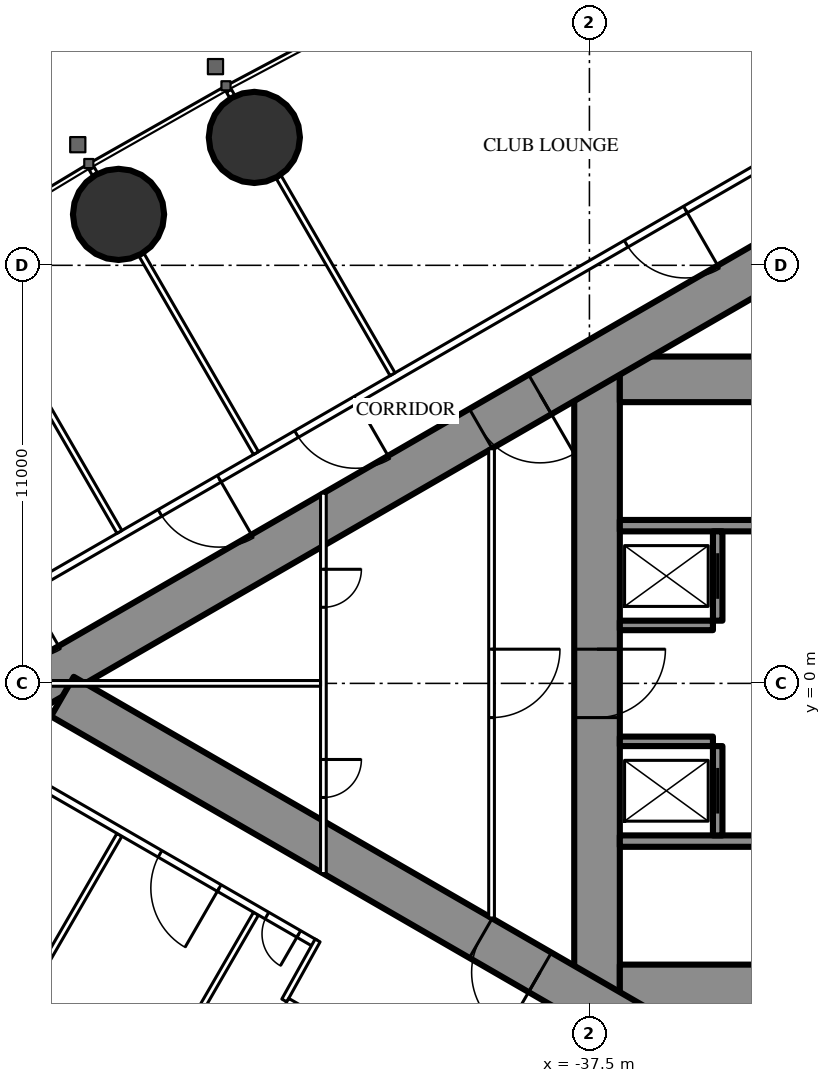
"""IFC4 building model, lengths in metres.
Left out: names, types, materials, properties, quantities, classifications, styles, units other than length and angle.
Written with IfcOpenShell. Run it as: python <this file> out.ifc"""

import sys

from ifc_helpers import new_model, si_unit, direction, frame, frame_2d, origin, origin_2d, place, context, subcontext, project, spatial, rectangle, circle, extrude, element, fill, save


model = new_model("IFC4")
c1 = context("Model", 3, precision=1e-05, world=origin(), true_north=direction((0.0, 1.0)))
c2 = subcontext(c1, "Body", "Model", "MODEL_VIEW")
j1 = project(units=[si_unit("LENGTHUNIT", "METRE"), si_unit("PLANEANGLEUNIT", "RADIAN")], contexts=[c1])
p1 = place(None, origin())
s1 = spatial("IfcSite", under=j1, at=p1, CompositionType="ELEMENT")
p2 = place(p1, origin())
s2 = spatial("IfcBuilding", under=s1, at=p2, CompositionType="ELEMENT")
p3 = place(p2, frame((0.0, 0.0, 247.7)))
s3 = spatial("IfcBuildingStorey", under=s2, at=p3, CompositionType="ELEMENT", Elevation=247.7)
for number, where, z_axis, x_axis in (
    (1, (-32.301, 17.745, 0.0), (0.0, 0.0, 1.0), (1.0, 0.0, 0.0)),
    (2, (-46.317, 14.365, 0.0), (0.0, 0.0, 1.0), (1.0, 0.0, 0.0)),
    (3, (-49.89, 12.34, 0.0), (0.0, 0.0, 1.0), (1.0, 0.0, 0.0)),
):
    element("IfcColumn", number, at=place(p3, frame(where, z_axis=z_axis, x_axis=x_axis)), inside=s3, PredefinedType="COLUMN", context=c2, shape_type="SweptSolid", body=[
        extrude(circle(Radius=1.2, at=origin_2d()), origin(), (0.0, 0.0, 1.0), 4.2),
    ])
p4 = place(p3, frame((-37.3, 8.6, 0.0), z_axis=(0.0, 0.0, 1.0), x_axis=(0.0, -1.0, 0.0)))
e4 = element("IfcWall", 4, at=p4, inside=s3, PredefinedType="SHEAR", context=c2, shape_type="SweptSolid", body=[
    extrude(rectangle(XDim=17.2, YDim=1.2, at=frame_2d((8.6, 0.0))), origin(), (0.0, 0.0, 1.0), 4.2),
])
p5 = place(p4, frame((7.7, 0.0, 0.0)))
e5 = element("IfcOpeningElement", 5, at=p5, cuts=e4, PredefinedType="OPENING", context=c2, shape_type="SweptSolid", body=[
    extrude(rectangle(XDim=1.8, YDim=2.2, at=frame_2d((0.9, 1.1))), frame((0.0, 0.61, 0.0), z_axis=(0.0, -1.0, 0.0), x_axis=(1.0, 0.0, 0.0)), (0.0, 0.0, 1.0), 1.22),
])
p6 = place(p3, frame((-28.3, 8.0, 0.0), z_axis=(0.0, 0.0, 1.0), x_axis=(-1.0, 0.0, 0.0)))
e6 = element("IfcWall", 6, at=p6, inside=s3, PredefinedType="SHEAR", context=c2, shape_type="SweptSolid", body=[
    extrude(rectangle(XDim=8.4, YDim=1.2, at=frame_2d((4.2, 0.0))), origin(), (0.0, 0.0, 1.0), 4.2),
])
p7 = place(p6, frame((0.25, 0.0, 0.0)))
e7 = element("IfcOpeningElement", 7, at=p7, cuts=e6, PredefinedType="OPENING", context=c2, shape_type="SweptSolid", body=[
    extrude(rectangle(XDim=1.0, YDim=2.2, at=frame_2d((0.5, 1.1))), frame((0.0, 0.61, 0.0), z_axis=(0.0, -1.0, 0.0), x_axis=(1.0, 0.0, 0.0)), (0.0, 0.0, 1.0), 1.22),
])
p8 = place(p3, frame((-28.3, -8.0, 0.0), z_axis=(0.0, 0.0, 1.0), x_axis=(-1.0, 0.0, 0.0)))
e8 = element("IfcWall", 8, at=p8, inside=s3, PredefinedType="SHEAR", context=c2, shape_type="SweptSolid", body=[
    extrude(rectangle(XDim=8.4, YDim=1.2, at=frame_2d((4.2, 0.0))), origin(), (0.0, 0.0, 1.0), 4.2),
])
p9 = place(p8, frame((0.25, 0.0, 0.0)))
e9 = element("IfcOpeningElement", 9, at=p9, cuts=e8, PredefinedType="OPENING", context=c2, shape_type="SweptSolid", body=[
    extrude(rectangle(XDim=1.0, YDim=2.2, at=frame_2d((0.5, 1.1))), frame((0.0, 0.61, 0.0), z_axis=(0.0, -1.0, 0.0), x_axis=(1.0, 0.0, 0.0)), (0.0, 0.0, 1.0), 1.22),
])
for number, where, z_axis, x_axis in (
    (10, (-28.3, 4.15, 0.0), (0.0, 0.0, 1.0), (-1.0, 0.0, 0.0)),
    (11, (-28.3, -4.15, 0.0), (0.0, 0.0, 1.0), (-1.0, 0.0, 0.0)),
):
    element("IfcWall", number, at=place(p3, frame(where, z_axis=z_axis, x_axis=x_axis)), inside=s3, PredefinedType="SHEAR", context=c2, shape_type="SweptSolid", body=[
        extrude(rectangle(XDim=8.4, YDim=0.3, at=frame_2d((4.2, 0.0))), origin(), (0.0, 0.0, 1.0), 4.2),
    ])
p10 = place(p3, frame((-34.125, 4.0, 0.0), z_axis=(0.0, 0.0, 1.0), x_axis=(0.0, -1.0, 0.0)))
e12 = element("IfcWall", 12, at=p10, inside=s3, PredefinedType="SHEAR", context=c2, shape_type="SweptSolid", body=[
    extrude(rectangle(XDim=2.35, YDim=0.25, at=frame_2d((1.175, 0.0))), origin(), (0.0, 0.0, 1.0), 4.2),
])
p11 = place(p10, frame((0.575, 0.0, 0.0)))
e13 = element("IfcOpeningElement", 13, at=p11, cuts=e12, PredefinedType="OPENING", context=c2, shape_type="SweptSolid", body=[
    extrude(rectangle(XDim=1.2, YDim=2.2, at=frame_2d((0.6, 1.1))), frame((0.0, 0.135, 0.0), z_axis=(0.0, -1.0, 0.0), x_axis=(1.0, 0.0, 0.0)), (0.0, 0.0, 1.0), 0.27),
])
p12 = place(p3, frame((-34.25, 1.525, 0.0), z_axis=(0.0, 0.0, 1.0), x_axis=(-1.0, 0.0, 0.0)))
e14 = element("IfcWall", 14, at=p12, inside=s3, PredefinedType="SHEAR", context=c2, shape_type="SweptSolid", body=[
    extrude(rectangle(XDim=2.45, YDim=0.25, at=frame_2d((1.225, 0.0))), origin(), (0.0, 0.0, 1.0), 4.2),
])
p13 = place(p3, frame((-34.125, -1.65, 0.0), z_axis=(0.0, 0.0, 1.0), x_axis=(0.0, -1.0, 0.0)))
e15 = element("IfcWall", 15, at=p13, inside=s3, PredefinedType="SHEAR", context=c2, shape_type="SweptSolid", body=[
    extrude(rectangle(XDim=2.35, YDim=0.25, at=frame_2d((1.175, 0.0))), origin(), (0.0, 0.0, 1.0), 4.2),
])
p14 = place(p13, frame((0.575, 0.0, 0.0)))
e16 = element("IfcOpeningElement", 16, at=p14, cuts=e15, PredefinedType="OPENING", context=c2, shape_type="SweptSolid", body=[
    extrude(rectangle(XDim=1.2, YDim=2.2, at=frame_2d((0.6, 1.1))), frame((0.0, 0.135, 0.0), z_axis=(0.0, -1.0, 0.0), x_axis=(1.0, 0.0, 0.0)), (0.0, 0.0, 1.0), 0.27),
])
p15 = place(p3, frame((-34.25, -1.525, 0.0), z_axis=(0.0, 0.0, 1.0), x_axis=(-1.0, 0.0, 0.0)))
e17 = element("IfcWall", 17, at=p15, inside=s3, PredefinedType="SHEAR", context=c2, shape_type="SweptSolid", body=[
    extrude(rectangle(XDim=2.45, YDim=0.25, at=frame_2d((1.225, 0.0))), origin(), (0.0, 0.0, 1.0), 4.2),
])
p16 = place(p3, frame((-27.2, 14.3, 0.0), z_axis=(0.0, 0.0, 1.0), x_axis=(-0.866026593062, -0.499997940104, 0.0)))
e18 = element("IfcWall", 18, at=p16, inside=s3, PredefinedType="SHEAR", context=c2, shape_type="SweptSolid", body=[
    extrude(rectangle(XDim=28.946, YDim=1.2, at=frame_2d((14.473, 0.0))), origin(), (0.0, 0.0, 1.0), 4.2),
])
p17 = place(p16, frame((4.6, 0.0, 0.0)))
e19 = element("IfcOpeningElement", 19, at=p17, cuts=e18, PredefinedType="OPENING", context=c2, shape_type="SweptSolid", body=[
    extrude(rectangle(XDim=1.0, YDim=2.2, at=frame_2d((0.5, 1.1))), frame((0.0, 0.61, 0.0), z_axis=(0.0, -1.0, 0.0), x_axis=(1.0, 0.0, 0.0)), (0.0, 0.0, 1.0), 1.22),
])
p18 = place(p16, frame((13.395, 0.0, 0.0)))
e20 = element("IfcOpeningElement", 20, at=p18, cuts=e18, PredefinedType="OPENING", context=c2, shape_type="SweptSolid", body=[
    extrude(rectangle(XDim=1.8, YDim=2.2, at=frame_2d((0.9, 1.1))), frame((0.0, 0.61, 0.0), z_axis=(0.0, -1.0, 0.0), x_axis=(1.0, 0.0, 0.0)), (0.0, 0.0, 1.0), 1.22),
])
p19 = place(p3, frame((-27.2, -14.3, 0.0), z_axis=(0.0, 0.0, 1.0), x_axis=(-0.866024021859, 0.500002393557, 0.0)))
e21 = element("IfcWall", 21, at=p19, inside=s3, PredefinedType="SHEAR", context=c2, shape_type="SweptSolid", body=[
    extrude(rectangle(XDim=27.907, YDim=1.2, at=frame_2d((13.954, 0.0))), origin(), (0.0, 0.0, 1.0), 4.2),
])
p20 = place(p19, frame((4.6, 0.0, 0.0)))
e22 = element("IfcOpeningElement", 22, at=p20, cuts=e21, PredefinedType="OPENING", context=c2, shape_type="SweptSolid", body=[
    extrude(rectangle(XDim=1.0, YDim=2.2, at=frame_2d((0.5, 1.1))), frame((0.0, 0.61, 0.0), z_axis=(0.0, -1.0, 0.0), x_axis=(1.0, 0.0, 0.0)), (0.0, 0.0, 1.0), 1.22),
])
p21 = place(p19, frame((13.395, 0.0, 0.0)))
e23 = element("IfcOpeningElement", 23, at=p21, cuts=e21, PredefinedType="OPENING", context=c2, shape_type="SweptSolid", body=[
    extrude(rectangle(XDim=1.8, YDim=2.2, at=frame_2d((0.9, 1.1))), frame((0.0, 0.61, 0.0), z_axis=(0.0, -1.0, 0.0), x_axis=(1.0, 0.0, 0.0)), (0.0, 0.0, 1.0), 1.22),
])
p22 = place(p3, frame((-28.681, 16.101, 0.0), z_axis=(0.0, 0.0, 1.0), x_axis=(-0.866024860443, -0.500000941094, 0.0)))
e24 = element("IfcWall", 24, at=p22, inside=s3, PredefinedType="PARTITIONING", context=c2, shape_type="SweptSolid", body=[
    extrude(rectangle(XDim=32.201, YDim=0.2, at=frame_2d((16.101, 0.0))), origin(), (0.0, 0.0, 1.0), 3.95),
])
p23 = place(p22, frame((7.266, 0.0, 0.0)))
e25 = element("IfcOpeningElement", 25, at=p23, cuts=e24, PredefinedType="OPENING", context=c2, shape_type="SweptSolid", body=[
    extrude(rectangle(XDim=1.8, YDim=2.2, at=frame_2d((0.9, 1.1))), frame((0.0, 0.11, 0.0), z_axis=(0.0, -1.0, 0.0), x_axis=(1.0, 0.0, 0.0)), (0.0, 0.0, 1.0), 0.22),
])
p24 = place(p22, frame((17.281, 0.0, 0.0)))
e26 = element("IfcOpeningElement", 26, at=p24, cuts=e24, PredefinedType="OPENING", context=c2, shape_type="SweptSolid", body=[
    extrude(rectangle(XDim=1.8, YDim=2.2, at=frame_2d((0.9, 1.1))), frame((0.0, 0.11, 0.0), z_axis=(0.0, -1.0, 0.0), x_axis=(1.0, 0.0, 0.0)), (0.0, 0.0, 1.0), 0.22),
])
p25 = place(p22, frame((21.43, 0.0, 0.0)))
e27 = element("IfcOpeningElement", 27, at=p25, cuts=e24, PredefinedType="OPENING", context=c2, shape_type="SweptSolid", body=[
    extrude(rectangle(XDim=1.8, YDim=2.2, at=frame_2d((0.9, 1.1))), frame((0.0, 0.11, 0.0), z_axis=(0.0, -1.0, 0.0), x_axis=(1.0, 0.0, 0.0)), (0.0, 0.0, 1.0), 0.22),
])
p26 = place(p22, frame((27.29, 0.0, 0.0)))
e28 = element("IfcOpeningElement", 28, at=p26, cuts=e24, PredefinedType="OPENING", context=c2, shape_type="SweptSolid", body=[
    extrude(rectangle(XDim=1.8, YDim=2.2, at=frame_2d((0.9, 1.1))), frame((0.0, 0.11, 0.0), z_axis=(0.0, -1.0, 0.0), x_axis=(1.0, 0.0, 0.0)), (0.0, 0.0, 1.0), 0.22),
])
p27 = place(p3, frame((-42.68, 8.134, 0.0), z_axis=(0.0, 0.0, 1.0), x_axis=(-0.499984479505, 0.866034364361, 0.0)))
e29 = element("IfcWall", 29, at=p27, inside=s3, PredefinedType="PARTITIONING", context=c2, shape_type="SweptSolid", body=[
    extrude(rectangle(XDim=5.995, YDim=0.15, at=frame_2d((2.998, 0.0))), origin(), (0.0, 0.0, 1.0), 3.05),
])
p28 = place(p3, frame((-46.898, 15.439, 0.0), z_axis=(0.0, 0.0, 1.0), x_axis=(-0.500232303069, 0.865891241997, 0.0)))
e30 = element("IfcWall", 30, at=p28, inside=s3, PredefinedType="PARTITIONING", context=c2, shape_type="SweptSolid", body=[
    extrude(rectangle(XDim=0.18, YDim=0.15, at=frame_2d((0.09, 0.0))), origin(), (0.0, 0.0, 1.0), 3.05),
])
p29 = place(p3, frame((-46.274, 6.059, 0.0), z_axis=(0.0, 0.0, 1.0), x_axis=(-0.500020471368, 0.866013584312, 0.0)))
e31 = element("IfcWall", 31, at=p29, inside=s3, PredefinedType="PARTITIONING", context=c2, shape_type="SweptSolid", body=[
    extrude(rectangle(XDim=6.028, YDim=0.15, at=frame_2d((3.014, 0.0))), origin(), (0.0, 0.0, 1.0), 3.05),
])
p30 = place(p3, frame((-50.508, 13.392, 0.0), z_axis=(0.0, 0.0, 1.0), x_axis=(-0.499644091975, 0.866230789891, 0.0)))
e32 = element("IfcWall", 32, at=p30, inside=s3, PredefinedType="PARTITIONING", context=c2, shape_type="SweptSolid", body=[
    extrude(rectangle(XDim=0.18, YDim=0.15, at=frame_2d((0.09, 0.0))), origin(), (0.0, 0.0, 1.0), 3.05),
])
p31 = place(p3, frame((-49.866, 3.985, 0.0), z_axis=(0.0, 0.0, 1.0), x_axis=(-0.500000694566, 0.866025002776, 0.0)))
e33 = element("IfcWall", 33, at=p31, inside=s3, PredefinedType="PARTITIONING", context=c2, shape_type="SweptSolid", body=[
    extrude(rectangle(XDim=5.95, YDim=0.15, at=frame_2d((2.975, 0.0))), origin(), (0.0, 0.0, 1.0), 3.05),
])
p32 = place(p3, frame((-46.274, -6.059, 0.0), z_axis=(0.0, 0.0, 1.0), x_axis=(-0.500020471368, -0.866013584312, 0.0)))
e34 = element("IfcWall", 34, at=p32, inside=s3, PredefinedType="PARTITIONING", context=c2, shape_type="SweptSolid", body=[
    extrude(rectangle(XDim=6.028, YDim=0.15, at=frame_2d((3.014, 0.0))), origin(), (0.0, 0.0, 1.0), 3.05),
])
p33 = place(p3, frame((-49.866, -3.985, 0.0), z_axis=(0.0, 0.0, 1.0), x_axis=(-0.500000694566, -0.866025002776, 0.0)))
e35 = element("IfcWall", 35, at=p33, inside=s3, PredefinedType="PARTITIONING", context=c2, shape_type="SweptSolid", body=[
    extrude(rectangle(XDim=5.95, YDim=0.15, at=frame_2d((2.975, 0.0))), origin(), (0.0, 0.0, 1.0), 3.05),
])
p34 = place(p3, frame((-44.715, -6.844, 0.0), z_axis=(0.0, 0.0, 1.0), x_axis=(-0.866025261224, 0.500000246922, 0.0)))
e36 = element("IfcWall", 36, at=p34, inside=s3, PredefinedType="PARTITIONING", context=c2, shape_type="SweptSolid", body=[
    extrude(rectangle(XDim=13.567, YDim=0.2, at=frame_2d((6.783, 0.0))), origin(), (0.0, 0.0, 1.0), 3.95),
])
p35 = place(p34, frame((8.716, 0.0, 0.0)))
e37 = element("IfcOpeningElement", 37, at=p35, cuts=e36, PredefinedType="OPENING", context=c2, shape_type="SweptSolid", body=[
    extrude(rectangle(XDim=1.8, YDim=2.2, at=frame_2d((0.9, 1.1))), frame((0.0, 0.11, 0.0), z_axis=(0.0, -1.0, 0.0), x_axis=(1.0, 0.0, 0.0)), (0.0, 0.0, 1.0), 0.22),
])
p36 = place(p34, frame((2.916, 0.0, 0.0)))
e38 = element("IfcOpeningElement", 38, at=p36, cuts=e36, PredefinedType="OPENING", context=c2, shape_type="SweptSolid", body=[
    extrude(rectangle(XDim=1.8, YDim=2.2, at=frame_2d((0.9, 1.1))), frame((0.0, 0.11, 0.0), z_axis=(0.0, -1.0, 0.0), x_axis=(1.0, 0.0, 0.0)), (0.0, 0.0, 1.0), 0.22),
])
p37 = place(p34, frame((0.5, 0.0, 0.0)))
e39 = element("IfcOpeningElement", 39, at=p37, cuts=e36, PredefinedType="OPENING", context=c2, shape_type="SweptSolid", body=[
    extrude(rectangle(XDim=0.967, YDim=2.2, at=frame_2d((0.483, 1.1))), frame((0.0, 0.11, 0.0), z_axis=(0.0, -1.0, 0.0), x_axis=(1.0, 0.0, 0.0)), (0.0, 0.0, 1.0), 0.22),
])
p38 = place(p3, frame((-44.652, -6.764, 0.0), z_axis=(0.0, 0.0, 1.0), x_axis=(-0.485528096672, -0.8742210632, 0.0)))
e40 = element("IfcWall", 40, at=p38, inside=s3, PredefinedType="PARTITIONING", context=c2, shape_type="SweptSolid", body=[
    extrude(rectangle(XDim=1.805, YDim=0.15, at=frame_2d((0.903, 0.0))), origin(), (0.0, 0.0, 1.0), 3.95),
])
p39 = place(p3, frame((-40.075, 6.174, 0.0), z_axis=(0.0, 0.0, 1.0), x_axis=(0.0, -1.0, 0.0)))
e41 = element("IfcWall", 41, at=p39, inside=s3, PredefinedType="PARTITIONING", context=c2, shape_type="SweptSolid", body=[
    extrude(rectangle(XDim=12.348, YDim=0.15, at=frame_2d((6.174, 0.0))), origin(), (0.0, 0.0, 1.0), 3.95),
])
p40 = place(p39, frame((5.274, 0.0, 0.0)))
e42 = element("IfcOpeningElement", 42, at=p40, cuts=e41, PredefinedType="OPENING", context=c2, shape_type="SweptSolid", body=[
    extrude(rectangle(XDim=1.8, YDim=2.2, at=frame_2d((0.9, 1.1))), frame((0.0, 0.085, 0.0), z_axis=(0.0, -1.0, 0.0), x_axis=(1.0, 0.0, 0.0)), (0.0, 0.0, 1.0), 0.17),
])
p41 = place(p3, frame((-44.5, 5.005, 0.0), z_axis=(0.0, 0.0, 1.0), x_axis=(0.0, -1.0, 0.0)))
e43 = element("IfcWall", 43, at=p41, inside=s3, PredefinedType="PARTITIONING", context=c2, shape_type="SweptSolid", body=[
    extrude(rectangle(XDim=10.009, YDim=0.15, at=frame_2d((5.005, 0.0))), origin(), (0.0, 0.0, 1.0), 3.1),
])
p42 = place(p41, frame((2.002, 0.0, 0.0)))
e44 = element("IfcOpeningElement", 44, at=p42, cuts=e43, PredefinedType="OPENING", context=c2, shape_type="SweptSolid", body=[
    extrude(rectangle(XDim=1.0, YDim=2.2, at=frame_2d((0.5, 1.1))), frame((0.0, 0.085, 0.0), z_axis=(0.0, -1.0, 0.0), x_axis=(1.0, 0.0, 0.0)), (0.0, 0.0, 1.0), 0.17),
])
p43 = place(p41, frame((7.007, 0.0, 0.0)))
e45 = element("IfcOpeningElement", 45, at=p43, cuts=e43, PredefinedType="OPENING", context=c2, shape_type="SweptSolid", body=[
    extrude(rectangle(XDim=1.0, YDim=2.2, at=frame_2d((0.5, 1.1))), frame((0.0, 0.085, 0.0), z_axis=(0.0, -1.0, 0.0), x_axis=(1.0, 0.0, 0.0)), (0.0, 0.0, 1.0), 0.17),
])
p44 = place(p3, frame((-44.575, 0.0, 0.0), z_axis=(0.0, 0.0, 1.0), x_axis=(-1.0, 0.0, 0.0)))
e46 = element("IfcWall", 46, at=p44, inside=s3, PredefinedType="PARTITIONING", context=c2, shape_type="SweptSolid", body=[
    extrude(rectangle(XDim=8.593, YDim=0.15, at=frame_2d((4.297, 0.0))), origin(), (0.0, 0.0, 1.0), 3.05),
])
p45 = place(p3, frame((-39.758, -11.697, 0.0), z_axis=(0.0, 0.0, 1.0), x_axis=(-0.866024194504, 0.500002094529, 0.0)))
e47 = element("IfcWall", 47, at=p45, inside=s3, PredefinedType="PARTITIONING", context=c2, shape_type="SweptSolid", body=[
    extrude(rectangle(XDim=6.6, YDim=0.25, at=frame_2d((3.3, 0.0))), origin(), (0.0, 0.0, 1.0), 3.95),
])
p46 = place(p45, frame((0.75, 0.0, 0.0)))
e48 = element("IfcOpeningElement", 48, at=p46, cuts=e47, PredefinedType="OPENING", context=c2, shape_type="SweptSolid", body=[
    extrude(rectangle(XDim=1.1, YDim=2.2, at=frame_2d((0.55, 1.1))), frame((0.0, 0.135, 0.0), z_axis=(0.0, -1.0, 0.0), x_axis=(1.0, 0.0, 0.0)), (0.0, 0.0, 1.0), 0.27),
])
p47 = place(p45, frame((2.75, 0.0, 0.0)))
e49 = element("IfcOpeningElement", 49, at=p47, cuts=e47, PredefinedType="OPENING", context=c2, shape_type="SweptSolid", body=[
    extrude(rectangle(XDim=1.1, YDim=2.2, at=frame_2d((0.55, 1.1))), frame((0.0, 0.135, 0.0), z_axis=(0.0, -1.0, 0.0), x_axis=(1.0, 0.0, 0.0)), (0.0, 0.0, 1.0), 0.27),
])
p48 = place(p45, frame((4.75, 0.0, 0.0)))
e50 = element("IfcOpeningElement", 50, at=p48, cuts=e47, PredefinedType="OPENING", context=c2, shape_type="SweptSolid", body=[
    extrude(rectangle(XDim=1.1, YDim=2.2, at=frame_2d((0.55, 1.1))), frame((0.0, 0.135, 0.0), z_axis=(0.0, -1.0, 0.0), x_axis=(1.0, 0.0, 0.0)), (0.0, 0.0, 1.0), 0.27),
])
p49 = place(p23, origin())
e51 = element("IfcDoor", 51, at=p49, inside=s3, OperationType="DOUBLE_DOOR_SINGLE_SWING", PredefinedType="DOOR", context=c2, shape_type="SweptSolid", body=[
    extrude(rectangle(XDim=1.8, YDim=2.2, at=frame_2d((0.9, 1.1))), frame((0.0, 0.025, 0.0), z_axis=(0.0, -1.0, 0.0), x_axis=(1.0, 0.0, 0.0)), (0.0, 0.0, 1.0), 0.05),
])
fill(e25, e51)
p50 = place(p24, origin())
e52 = element("IfcDoor", 52, at=p50, inside=s3, OperationType="DOUBLE_DOOR_SINGLE_SWING", PredefinedType="DOOR", context=c2, shape_type="SweptSolid", body=[
    extrude(rectangle(XDim=1.8, YDim=2.2, at=frame_2d((0.9, 1.1))), frame((0.0, 0.025, 0.0), z_axis=(0.0, -1.0, 0.0), x_axis=(1.0, 0.0, 0.0)), (0.0, 0.0, 1.0), 0.05),
])
fill(e26, e52)
p51 = place(p25, origin())
e53 = element("IfcDoor", 53, at=p51, inside=s3, OperationType="DOUBLE_DOOR_SINGLE_SWING", PredefinedType="DOOR", context=c2, shape_type="SweptSolid", body=[
    extrude(rectangle(XDim=1.8, YDim=2.2, at=frame_2d((0.9, 1.1))), frame((0.0, 0.025, 0.0), z_axis=(0.0, -1.0, 0.0), x_axis=(1.0, 0.0, 0.0)), (0.0, 0.0, 1.0), 0.05),
])
fill(e27, e53)
p52 = place(p36, origin())
e54 = element("IfcDoor", 54, at=p52, inside=s3, OperationType="DOUBLE_DOOR_SINGLE_SWING", PredefinedType="DOOR", context=c2, shape_type="SweptSolid", body=[
    extrude(rectangle(XDim=1.8, YDim=2.2, at=frame_2d((0.9, 1.1))), frame((0.0, 0.025, 0.0), z_axis=(0.0, -1.0, 0.0), x_axis=(1.0, 0.0, 0.0)), (0.0, 0.0, 1.0), 0.05),
])
fill(e38, e54)
p53 = place(p37, origin())
e55 = element("IfcDoor", 55, at=p53, inside=s3, OperationType="SINGLE_SWING_LEFT", PredefinedType="DOOR", context=c2, shape_type="SweptSolid", body=[
    extrude(rectangle(XDim=0.967, YDim=2.2, at=frame_2d((0.483, 1.1))), frame((0.0, 0.025, 0.0), z_axis=(0.0, -1.0, 0.0), x_axis=(1.0, 0.0, 0.0)), (0.0, 0.0, 1.0), 0.05),
])
fill(e39, e55)
p54 = place(p40, origin())
e56 = element("IfcDoor", 56, at=p54, inside=s3, OperationType="DOUBLE_DOOR_SINGLE_SWING", PredefinedType="DOOR", context=c2, shape_type="SweptSolid", body=[
    extrude(rectangle(XDim=1.8, YDim=2.2, at=frame_2d((0.9, 1.1))), frame((0.0, 0.025, 0.0), z_axis=(0.0, -1.0, 0.0), x_axis=(1.0, 0.0, 0.0)), (0.0, 0.0, 1.0), 0.05),
])
fill(e42, e56)
p55 = place(p42, origin())
e57 = element("IfcDoor", 57, at=p55, inside=s3, OperationType="SINGLE_SWING_LEFT", PredefinedType="DOOR", context=c2, shape_type="SweptSolid", body=[
    extrude(rectangle(XDim=1.0, YDim=2.2, at=frame_2d((0.5, 1.1))), frame((0.0, 0.025, 0.0), z_axis=(0.0, -1.0, 0.0), x_axis=(1.0, 0.0, 0.0)), (0.0, 0.0, 1.0), 0.05),
])
fill(e44, e57)
p56 = place(p43, origin())
e58 = element("IfcDoor", 58, at=p56, inside=s3, OperationType="SINGLE_SWING_LEFT", PredefinedType="DOOR", context=c2, shape_type="SweptSolid", body=[
    extrude(rectangle(XDim=1.0, YDim=2.2, at=frame_2d((0.5, 1.1))), frame((0.0, 0.025, 0.0), z_axis=(0.0, -1.0, 0.0), x_axis=(1.0, 0.0, 0.0)), (0.0, 0.0, 1.0), 0.05),
])
fill(e45, e58)
p57 = place(p18, origin())
e59 = element("IfcDoor", 59, at=p57, inside=s3, OperationType="DOUBLE_DOOR_SINGLE_SWING", PredefinedType="DOOR", context=c2, shape_type="SweptSolid", body=[
    extrude(rectangle(XDim=1.8, YDim=2.2, at=frame_2d((0.9, 1.1))), frame((0.0, 0.025, 0.0), z_axis=(0.0, -1.0, 0.0), x_axis=(1.0, 0.0, 0.0)), (0.0, 0.0, 1.0), 0.05),
])
fill(e20, e59)
p58 = place(p21, origin())
e60 = element("IfcDoor", 60, at=p58, inside=s3, OperationType="DOUBLE_DOOR_SINGLE_SWING", PredefinedType="DOOR", context=c2, shape_type="SweptSolid", body=[
    extrude(rectangle(XDim=1.8, YDim=2.2, at=frame_2d((0.9, 1.1))), frame((0.0, 0.025, 0.0), z_axis=(0.0, -1.0, 0.0), x_axis=(1.0, 0.0, 0.0)), (0.0, 0.0, 1.0), 0.05),
])
fill(e23, e60)
p59 = place(p5, origin())
e61 = element("IfcDoor", 61, at=p59, inside=s3, OperationType="DOUBLE_DOOR_SINGLE_SWING", PredefinedType="DOOR", context=c2, shape_type="SweptSolid", body=[
    extrude(rectangle(XDim=1.8, YDim=2.2, at=frame_2d((0.9, 1.1))), frame((0.0, 0.025, 0.0), z_axis=(0.0, -1.0, 0.0), x_axis=(1.0, 0.0, 0.0)), (0.0, 0.0, 1.0), 0.05),
])
fill(e5, e61)
p60 = place(p11, origin())
e62 = element("IfcDoor", 62, at=p60, inside=s3, OperationType="DOUBLE_DOOR_SLIDING", PredefinedType="USERDEFINED", context=c2, shape_type="SweptSolid", body=[
    extrude(rectangle(XDim=1.2, YDim=2.2, at=frame_2d((0.6, 1.1))), frame((0.0, 0.025, 0.0), z_axis=(0.0, -1.0, 0.0), x_axis=(1.0, 0.0, 0.0)), (0.0, 0.0, 1.0), 0.05),
])
fill(e13, e62)
p61 = place(p14, origin())
e63 = element("IfcDoor", 63, at=p61, inside=s3, OperationType="DOUBLE_DOOR_SLIDING", PredefinedType="USERDEFINED", context=c2, shape_type="SweptSolid", body=[
    extrude(rectangle(XDim=1.2, YDim=2.2, at=frame_2d((0.6, 1.1))), frame((0.0, 0.025, 0.0), z_axis=(0.0, -1.0, 0.0), x_axis=(1.0, 0.0, 0.0)), (0.0, 0.0, 1.0), 0.05),
])
fill(e16, e63)
save(model, sys.argv[1])
